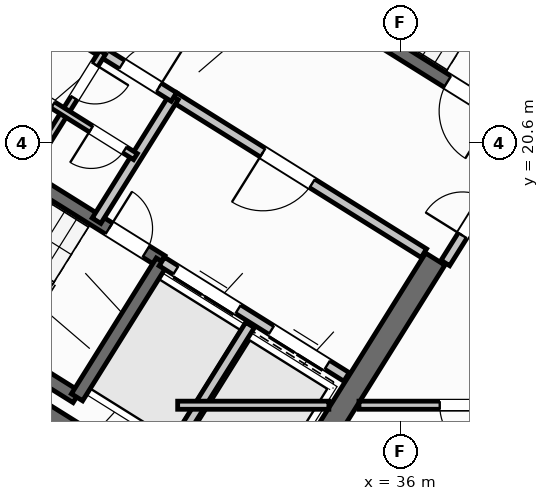
"""IFC4 building model, lengths in metres.
Left out: names, types, materials, properties, quantities, classifications, styles, units other than length and angle.
Written with IfcOpenShell. Run it as: python <this file> out.ifc"""

import sys

from ifc_helpers import new_model, si_unit, direction, frame, frame_2d, origin, place, context, subcontext, project, spatial, rectangle, extrude, source, transform, mapped, element, fill, save


model = new_model("IFC4")
c1 = context("Model", 3, precision=1e-05, world=origin(), true_north=direction((0.0, 1.0)))
c2 = subcontext(c1, "Body", "Model", "MODEL_VIEW")
j1 = project(units=[si_unit("LENGTHUNIT", "METRE"), si_unit("PLANEANGLEUNIT", "RADIAN")], contexts=[c1])
p1 = place(None, origin())
s1 = spatial("IfcSite", under=j1, at=p1, CompositionType="ELEMENT")
p2 = place(p1, origin())
s2 = spatial("IfcBuilding", under=s1, at=p2, CompositionType="ELEMENT")
p3 = place(p2, frame((0.0, 0.0, 277.2)))
s3 = spatial("IfcBuildingStorey", under=s2, at=p3, CompositionType="ELEMENT", Elevation=277.2)
p4 = place(p3, frame((33.324, 12.503, 0.0), z_axis=(0.0, 0.0, 1.0), x_axis=(-0.848043529849, 0.529926571782, 0.0)))
e1 = element("IfcWall", 1, at=p4, inside=s3, PredefinedType="SHEAR", context=c2, shape_type="SweptSolid", body=[
    extrude(rectangle(XDim=13.04, YDim=0.45, at=frame_2d((6.52, 0.0))), origin(), (0.0, 0.0, 1.0), 3.35),
])
p5 = place(p3, frame((36.683, 18.304, 0.0), z_axis=(0.0, 0.0, 1.0), x_axis=(-0.529904039071, -0.848057609704, 0.0)))
e2 = element("IfcWall", 2, at=p5, inside=s3, PredefinedType="SHEAR", context=c2, shape_type="SweptSolid", body=[
    extrude(rectangle(XDim=6.475, YDim=0.45, at=frame_2d((3.238, 0.0))), origin(), (0.0, 0.0, 1.0), 3.35),
])
p6 = place(p3, frame((29.268, 6.429, 0.0), z_axis=(0.0, 0.0, 1.0), x_axis=(-0.848049971435, 0.529916263149, 0.0)))
e3 = element("IfcWall", 3, at=p6, inside=s3, PredefinedType="STANDARD", context=c2, shape_type="SweptSolid", body=[
    extrude(rectangle(XDim=31.588, YDim=0.32, at=frame_2d((15.794, 0.0))), origin(), (0.0, 0.0, 1.0), 3.35),
])
p7 = place(p6, frame((16.362, 0.0, 0.0)))
e4 = element("IfcOpeningElement", 4, at=p7, cuts=e3, PredefinedType="OPENING", context=c2, shape_type="SweptSolid", body=[
    extrude(rectangle(XDim=1.2, YDim=2.15, at=frame_2d((0.6, 1.075))), frame((0.0, 0.17, 0.0), z_axis=(0.0, -1.0, 0.0), x_axis=(1.0, 0.0, 0.0)), (0.0, 0.0, 1.0), 0.34),
])
p8 = place(p6, frame((3.859, 0.0, 0.9)))
e5 = element("IfcOpeningElement", 5, at=p8, cuts=e3, PredefinedType="OPENING", context=c2, shape_type="SweptSolid", body=[
    extrude(rectangle(XDim=1.65, YDim=1.45, at=frame_2d((0.825, 0.725))), frame((0.0, 0.17, 0.0), z_axis=(0.0, -1.0, 0.0), x_axis=(1.0, 0.0, 0.0)), (0.0, 0.0, 1.0), 0.34),
])
p9 = place(p6, frame((10.519, 0.0, 0.9)))
e6 = element("IfcOpeningElement", 6, at=p9, cuts=e3, PredefinedType="OPENING", context=c2, shape_type="SweptSolid", body=[
    extrude(rectangle(XDim=1.65, YDim=1.45, at=frame_2d((0.825, 0.725))), frame((0.0, 0.17, 0.0), z_axis=(0.0, -1.0, 0.0), x_axis=(1.0, 0.0, 0.0)), (0.0, 0.0, 1.0), 0.34),
])
p10 = place(p6, frame((20.015, 0.0, 0.95)))
e7 = element("IfcOpeningElement", 7, at=p10, cuts=e3, PredefinedType="OPENING", context=c2, shape_type="SweptSolid", body=[
    extrude(rectangle(XDim=1.95, YDim=1.35, at=frame_2d((0.975, 0.675))), frame((0.0, 0.17, 0.0), z_axis=(0.0, -1.0, 0.0), x_axis=(1.0, 0.0, 0.0)), (0.0, 0.0, 1.0), 0.34),
])
p11 = place(p6, frame((23.715, 0.0, 1.0)))
e8 = element("IfcOpeningElement", 8, at=p11, cuts=e3, PredefinedType="OPENING", context=c2, shape_type="SweptSolid", body=[
    extrude(rectangle(XDim=0.9, YDim=1.25, at=frame_2d((0.45, 0.625))), frame((0.0, 0.17, 0.0), z_axis=(0.0, -1.0, 0.0), x_axis=(1.0, 0.0, 0.0)), (0.0, 0.0, 1.0), 0.34),
])
p12 = place(p6, frame((27.706, 0.0, 0.9)))
e9 = element("IfcOpeningElement", 9, at=p12, cuts=e3, PredefinedType="OPENING", context=c2, shape_type="SweptSolid", body=[
    extrude(rectangle(XDim=1.65, YDim=1.45, at=frame_2d((0.825, 0.725))), frame((0.0, 0.17, 0.0), z_axis=(0.0, -1.0, 0.0), x_axis=(1.0, 0.0, 0.0)), (0.0, 0.0, 1.0), 0.34),
])
p13 = place(p3, frame((29.605, 15.581, 0.0), z_axis=(0.0, 0.0, 1.0), x_axis=(-0.848036911448, 0.529937163087, 0.0)))
e10 = element("IfcWall", 10, at=p13, inside=s3, PredefinedType="SHEAR", context=c2, shape_type="SweptSolid", body=[
    extrude(rectangle(XDim=7.46, YDim=0.26, at=frame_2d((3.73, 0.0))), origin(), (0.0, 0.0, 1.0), 3.35),
])
p14 = place(p3, frame((31.28, 18.261, 0.0), z_axis=(0.0, 0.0, 1.0), x_axis=(-0.848051618787, 0.529913626805, 0.0)))
e11 = element("IfcWall", 11, at=p14, inside=s3, PredefinedType="SHEAR", context=c2, shape_type="SweptSolid", body=[
    extrude(rectangle(XDim=7.46, YDim=0.26, at=frame_2d((3.73, 0.0))), origin(), (0.0, 0.0, 1.0), 3.35),
])
p15 = place(p14, frame((0.36, 0.0, 0.0)))
e12 = element("IfcOpeningElement", 12, at=p15, cuts=e11, PredefinedType="OPENING", context=c2, shape_type="SweptSolid", body=[
    extrude(rectangle(XDim=0.86, YDim=2.05, at=frame_2d((0.43, 1.025))), frame((0.0, 0.14, 0.0), z_axis=(0.0, -1.0, 0.0), x_axis=(1.0, 0.0, 0.0)), (0.0, 0.0, 1.0), 0.28),
])
p16 = place(p3, frame((31.288, 18.256, 0.0), z_axis=(0.0, 0.0, 1.0), x_axis=(-0.529943379326, -0.848033026897, 0.0)))
e13 = element("IfcWall", 13, at=p16, inside=s3, PredefinedType="SHEAR", context=c2, shape_type="SweptSolid", body=[
    extrude(rectangle(XDim=3.16, YDim=0.26, at=frame_2d((1.58, 0.0))), origin(), (0.0, 0.0, 1.0), 3.35),
])
p17 = place(p3, frame((38.046, 21.108, 0.0), z_axis=(0.0, 0.0, 1.0), x_axis=(-0.848054434086, 0.529909121291, 0.0)))
e14 = element("IfcWall", 14, at=p17, inside=s3, PredefinedType="SHEAR", context=c2, shape_type="SweptSolid", body=[
    extrude(rectangle(XDim=7.33, YDim=0.26, at=frame_2d((3.665, 0.0))), origin(), (0.0, 0.0, 1.0), 3.35),
])
p18 = place(p17, frame((0.22, 0.0, 0.0)))
e15 = element("IfcOpeningElement", 15, at=p18, cuts=e14, PredefinedType="OPENING", context=c2, shape_type="SweptSolid", body=[
    extrude(rectangle(XDim=1.1, YDim=2.1, at=frame_2d((0.55, 1.05))), frame((0.0, 0.14, 0.0), z_axis=(0.0, -1.0, 0.0), x_axis=(1.0, 0.0, 0.0)), (0.0, 0.0, 1.0), 0.28),
])
p19 = place(p3, frame((34.933, 15.978, 0.0), z_axis=(0.0, 0.0, 1.0), x_axis=(-0.848055739377, 0.529907032327, 0.0)))
e16 = element("IfcWall", 16, at=p19, inside=s3, PredefinedType="STANDARD", context=c2, shape_type="SweptSolid", body=[
    extrude(rectangle(XDim=4.298, YDim=0.2, at=frame_2d((2.149, 0.0))), origin(), (0.0, 0.0, 1.0), 3.34),
])
p20 = place(p19, frame((0.448, 0.0, 0.0)))
e17 = element("IfcOpeningElement", 17, at=p20, cuts=e16, PredefinedType="OPENING", context=c2, shape_type="SweptSolid", body=[
    extrude(rectangle(XDim=1.3, YDim=2.2, at=frame_2d((0.65, 1.1))), frame((0.0, 0.11, 0.0), z_axis=(0.0, -1.0, 0.0), x_axis=(1.0, 0.0, 0.0)), (0.0, 0.0, 1.0), 0.22),
])
p21 = place(p19, frame((2.523, 0.0, 0.0)))
e18 = element("IfcOpeningElement", 18, at=p21, cuts=e16, PredefinedType="OPENING", context=c2, shape_type="SweptSolid", body=[
    extrude(rectangle(XDim=1.45, YDim=2.25, at=frame_2d((0.725, 1.125))), frame((0.0, 0.11, 0.0), z_axis=(0.0, -1.0, 0.0), x_axis=(1.0, 0.0, 0.0)), (0.0, 0.0, 1.0), 0.22),
])
p22 = place(p3, frame((36.459, 18.421, 0.0), z_axis=(0.0, 0.0, 1.0), x_axis=(-0.848059591691, 0.529900867089, 0.0)))
e19 = element("IfcWall", 19, at=p22, inside=s3, PredefinedType="STANDARD", context=c2, shape_type="SweptSolid", body=[
    extrude(rectangle(XDim=5.818, YDim=0.2, at=frame_2d((2.909, 0.0))), origin(), (0.0, 0.0, 1.0), 3.34),
])
p23 = place(p22, frame((2.598, 0.0, 0.0)))
e20 = element("IfcOpeningElement", 20, at=p23, cuts=e19, PredefinedType="OPENING", context=c2, shape_type="SweptSolid", body=[
    extrude(rectangle(XDim=1.15, YDim=2.1, at=frame_2d((0.575, 1.05))), frame((0.0, 0.11, 0.0), z_axis=(0.0, -1.0, 0.0), x_axis=(1.0, 0.0, 0.0)), (0.0, 0.0, 1.0), 0.22),
])
p24 = place(p3, frame((33.029, 17.003, 0.0), z_axis=(0.0, 0.0, 1.0), x_axis=(-0.529916267533, -0.848049968695, 0.0)))
e21 = element("IfcWall", 21, at=p24, inside=s3, PredefinedType="STANDARD", context=c2, shape_type="SweptSolid", body=[
    extrude(rectangle(XDim=2.92, YDim=0.2, at=frame_2d((1.46, 0.0))), origin(), (0.0, 0.0, 1.0), 3.34),
])
p25 = place(p3, frame((31.525, 21.504, 0.0), z_axis=(0.0, 0.0, 1.0), x_axis=(-0.529907497854, -0.848055448493, 0.0)))
e22 = element("IfcWall", 22, at=p25, inside=s3, PredefinedType="STANDARD", context=c2, shape_type="SweptSolid", body=[
    extrude(rectangle(XDim=2.88, YDim=0.2, at=frame_2d((1.44, 0.0))), origin(), (0.0, 0.0, 1.0), 3.34),
])
p26 = place(p3, frame((31.525, 21.504, 0.0), z_axis=(0.0, 0.0, 1.0), x_axis=(-0.848042066329, 0.529928913853, 0.0)))
e23 = element("IfcWall", 23, at=p26, inside=s3, PredefinedType="STANDARD", context=c2, shape_type="SweptSolid", body=[
    extrude(rectangle(XDim=6.268, YDim=0.2, at=frame_2d((3.134, 0.0))), origin(), (0.0, 0.0, 1.0), 3.34),
])
p27 = place(p26, frame((4.4, 0.0, 0.0)))
e24 = element("IfcOpeningElement", 24, at=p27, cuts=e23, PredefinedType="OPENING", context=c2, shape_type="SweptSolid", body=[
    extrude(rectangle(XDim=0.86, YDim=2.05, at=frame_2d((0.43, 1.025))), frame((0.0, 0.11, 0.0), z_axis=(0.0, -1.0, 0.0), x_axis=(1.0, 0.0, 0.0)), (0.0, 0.0, 1.0), 0.22),
])
p28 = place(p26, frame((0.35, 0.0, 0.0)))
e25 = element("IfcOpeningElement", 25, at=p28, cuts=e23, PredefinedType="OPENING", context=c2, shape_type="SweptSolid", body=[
    extrude(rectangle(XDim=0.86, YDim=2.05, at=frame_2d((0.43, 1.025))), frame((0.0, 0.11, 0.0), z_axis=(0.0, -1.0, 0.0), x_axis=(1.0, 0.0, 0.0)), (0.0, 0.0, 1.0), 0.22),
])
p29 = place(p3, frame((30.117, 22.384, 0.0), z_axis=(0.0, 0.0, 1.0), x_axis=(-0.529951914384, -0.848027693204, 0.0)))
e26 = element("IfcWall", 26, at=p29, inside=s3, PredefinedType="PLUMBINGWALL", context=c2, shape_type="SweptSolid", body=[
    extrude(rectangle(XDim=1.4, YDim=0.14, at=frame_2d((0.7, 0.0))), origin(), (0.0, 0.0, 1.0), 3.34),
])
p30 = place(p29, frame((0.28, 0.0, 0.0)))
e27 = element("IfcOpeningElement", 27, at=p30, cuts=e26, PredefinedType="OPENING", context=c2, shape_type="SweptSolid", body=[
    extrude(rectangle(XDim=0.78, YDim=2.05, at=frame_2d((0.39, 1.025))), frame((0.0, 0.08, 0.0), z_axis=(0.0, -1.0, 0.0), x_axis=(1.0, 0.0, 0.0)), (0.0, 0.0, 1.0), 0.16),
])
p31 = place(p3, frame((29.375, 21.196, 0.0), z_axis=(0.0, 0.0, 1.0), x_axis=(-0.529865479138, -0.848081702443, 0.0)))
e28 = element("IfcWall", 28, at=p31, inside=s3, PredefinedType="PLUMBINGWALL", context=c2, shape_type="SweptSolid", body=[
    extrude(rectangle(XDim=1.48, YDim=0.14, at=frame_2d((0.74, 0.0))), origin(), (0.0, 0.0, 1.0), 3.34),
])
p32 = place(p3, frame((30.766, 20.327, 0.0), z_axis=(0.0, 0.0, 1.0), x_axis=(-0.848052663127, 0.529911955482, 0.0)))
e29 = element("IfcWall", 29, at=p32, inside=s3, PredefinedType="PLUMBINGWALL", context=c2, shape_type="SweptSolid", body=[
    extrude(rectangle(XDim=3.28, YDim=0.14, at=frame_2d((1.64, 0.0))), origin(), (0.0, 0.0, 1.0), 3.34),
])
p33 = place(p32, frame((0.25, 0.0, 0.0)))
e30 = element("IfcOpeningElement", 30, at=p33, cuts=e29, PredefinedType="OPENING", context=c2, shape_type="SweptSolid", body=[
    extrude(rectangle(XDim=0.78, YDim=2.05, at=frame_2d((0.39, 1.025))), frame((0.0, 0.08, 0.0), z_axis=(0.0, -1.0, 0.0), x_axis=(1.0, 0.0, 0.0)), (0.0, 0.0, 1.0), 0.16),
])
p34 = place(p32, frame((1.92, 0.0, 0.0)))
e31 = element("IfcOpeningElement", 31, at=p34, cuts=e29, PredefinedType="OPENING", context=c2, shape_type="SweptSolid", body=[
    extrude(rectangle(XDim=0.78, YDim=2.05, at=frame_2d((0.39, 1.025))), frame((0.0, 0.08, 0.0), z_axis=(0.0, -1.0, 0.0), x_axis=(1.0, 0.0, 0.0)), (0.0, 0.0, 1.0), 0.16),
])
p35 = place(p3, frame((32.164, 10.374, 0.0), z_axis=(0.0, 0.0, 1.0), x_axis=(-0.848044107957, 0.529925646633, 0.0)))
e32 = element("IfcWall", 32, at=p35, inside=s3, PredefinedType="PARTITIONING", context=c2, shape_type="SweptSolid", body=[
    extrude(rectangle(XDim=15.57, YDim=0.16, at=frame_2d((7.785, 0.0))), origin(), (0.0, 0.0, 1.0), 3.34),
])
p36 = place(p35, frame((10.83, 0.0, 0.0)))
e33 = element("IfcOpeningElement", 33, at=p36, cuts=e32, PredefinedType="OPENING", context=c2, shape_type="SweptSolid", body=[
    extrude(rectangle(XDim=1.0, YDim=2.1, at=frame_2d((0.5, 1.05))), frame((0.0, 0.09, 0.0), z_axis=(0.0, -1.0, 0.0), x_axis=(1.0, 0.0, 0.0)), (0.0, 0.0, 1.0), 0.18),
])
p37 = place(p3, frame((29.72, 8.859, 0.0), z_axis=(0.0, 0.0, 1.0), x_axis=(-0.848049134363, 0.529917602752, 0.0)))
e34 = element("IfcWall", 34, at=p37, inside=s3, PredefinedType="PLUMBINGWALL", context=c2, shape_type="SweptSolid", body=[
    extrude(rectangle(XDim=14.3, YDim=0.14, at=frame_2d((7.15, 0.0))), origin(), (0.0, 0.0, 1.0), 3.34),
])
p38 = place(p37, frame((9.57, 0.0, 0.0)))
e35 = element("IfcOpeningElement", 35, at=p38, cuts=e34, PredefinedType="OPENING", context=c2, shape_type="SweptSolid", body=[
    extrude(rectangle(XDim=0.92, YDim=2.08, at=frame_2d((0.46, 1.04))), frame((0.0, 0.08, 0.0), z_axis=(0.0, -1.0, 0.0), x_axis=(1.0, 0.0, 0.0)), (0.0, 0.0, 1.0), 0.16),
])
p39 = place(p3, frame((38.451, 20.737, 0.0), z_axis=(0.0, 0.0, 1.0), x_axis=(-0.529924799939, -0.848044637038, 0.0)))
e36 = element("IfcWall", 36, at=p39, inside=s3, PredefinedType="STANDARD", context=c2, shape_type="SweptSolid", body=[
    extrude(rectangle(XDim=2.96, YDim=0.2, at=frame_2d((1.48, 0.0))), origin(), (0.0, 0.0, 1.0), 3.34),
])
p40 = place(p39, frame((1.46, 0.0, 0.0)))
e37 = element("IfcOpeningElement", 37, at=p40, cuts=e36, PredefinedType="OPENING", context=c2, shape_type="SweptSolid", body=[
    extrude(rectangle(XDim=0.86, YDim=2.05, at=frame_2d((0.43, 1.025))), frame((0.0, 0.11, 0.0), z_axis=(0.0, -1.0, 0.0), x_axis=(1.0, 0.0, 0.0)), (0.0, 0.0, 1.0), 0.22),
])
p41 = place(p3, frame((31.6, 15.42, 0.0), z_axis=(0.0, 0.0, 1.0), x_axis=(1.0, 0.0, 0.0)))
e38 = element("IfcWall", 38, at=p41, inside=s3, PredefinedType="PARTITIONING", context=c2, shape_type="SweptSolid", body=[
    extrude(rectangle(XDim=2.984, YDim=0.16, at=frame_2d((1.492, 0.0))), origin(), (0.0, 0.0, 1.0), 3.34),
])
p42 = place(p3, frame((35.178, 15.42, 0.0), z_axis=(0.0, 0.0, 1.0), x_axis=(1.0, 0.0, 0.0)))
e39 = element("IfcWall", 39, at=p42, inside=s3, PredefinedType="PARTITIONING", context=c2, shape_type="SweptSolid", body=[
    extrude(rectangle(XDim=9.021, YDim=0.16, at=frame_2d((4.511, 0.0))), origin(), (0.0, 0.0, 1.0), 3.34),
])
p43 = place(p42, frame((1.594, 0.0, 0.0)))
e40 = element("IfcOpeningElement", 40, at=p43, cuts=e39, PredefinedType="OPENING", context=c2, shape_type="SweptSolid", body=[
    extrude(rectangle(XDim=1.0, YDim=2.1, at=frame_2d((0.5, 1.05))), frame((0.0, 0.09, 0.0), z_axis=(0.0, -1.0, 0.0), x_axis=(1.0, 0.0, 0.0)), (0.0, 0.0, 1.0), 0.18),
])
m1 = source(origin(), c2, "Body", "SweptSolid", [
    extrude(rectangle(XDim=0.86, YDim=2.05, at=frame_2d((0.43, 1.025))), frame((0.0, 0.025, 0.0), z_axis=(0.0, -1.0, 0.0), x_axis=(1.0, 0.0, 0.0)), (0.0, 0.0, 1.0), 0.05),
])
p44 = place(p15, frame((0.86, 0.0, 0.0), z_axis=(0.0, 0.0, 1.0), x_axis=(-1.0, 0.0, 0.0)))
e41 = element("IfcDoor", 41, at=p44, inside=s3, OperationType="SINGLE_SWING_LEFT", PredefinedType="DOOR", context=c2, shape_type="MappedRepresentation", body=[
    mapped(m1, transform((0.0, 0.0, 0.0), scale=1.0)),
])
fill(e12, e41)
m2 = source(origin(), c2, "Body", "SweptSolid", [
    extrude(rectangle(XDim=1.1, YDim=2.1, at=frame_2d((0.55, 1.05))), frame((0.0, 0.025, 0.0), z_axis=(0.0, -1.0, 0.0), x_axis=(1.0, 0.0, 0.0)), (0.0, 0.0, 1.0), 0.05),
])
p45 = place(p18, origin())
e42 = element("IfcDoor", 42, at=p45, inside=s3, OperationType="SINGLE_SWING_LEFT", PredefinedType="DOOR", context=c2, shape_type="MappedRepresentation", body=[
    mapped(m2, transform((0.0, 0.0, 0.0), scale=1.0)),
])
fill(e15, e42)
m3 = source(origin(), c2, "Body", "SweptSolid", [
    extrude(rectangle(XDim=1.15, YDim=2.1, at=frame_2d((0.575, 1.05))), frame((0.0, 0.025, 0.0), z_axis=(0.0, -1.0, 0.0), x_axis=(1.0, 0.0, 0.0)), (0.0, 0.0, 1.0), 0.05),
])
p46 = place(p23, origin())
e43 = element("IfcDoor", 43, at=p46, inside=s3, OperationType="SINGLE_SWING_RIGHT", PredefinedType="DOOR", context=c2, shape_type="MappedRepresentation", body=[
    mapped(m3, transform((0.0, 0.0, 0.0), scale=1.0)),
])
fill(e20, e43)
m4 = source(origin(), c2, "Body", "SweptSolid", [
    extrude(rectangle(XDim=1.3, YDim=2.2, at=frame_2d((0.65, 1.1))), frame((0.0, 0.025, 0.0), z_axis=(0.0, -1.0, 0.0), x_axis=(1.0, 0.0, 0.0)), (0.0, 0.0, 1.0), 0.05),
])
p47 = place(p20, origin())
e44 = element("IfcDoor", 44, at=p47, inside=s3, OperationType="DOUBLE_DOOR_SLIDING", PredefinedType="DOOR", context=c2, shape_type="MappedRepresentation", body=[
    mapped(m4, transform((0.0, 0.0, 0.0), scale=1.0)),
])
fill(e17, e44)
m5 = source(origin(), c2, "Body", "SweptSolid", [
    extrude(rectangle(XDim=1.45, YDim=2.25, at=frame_2d((0.725, 1.125))), frame((0.0, 0.025, 0.0), z_axis=(0.0, -1.0, 0.0), x_axis=(1.0, 0.0, 0.0)), (0.0, 0.0, 1.0), 0.05),
])
p48 = place(p21, origin())
e45 = element("IfcDoor", 45, at=p48, inside=s3, OperationType="DOUBLE_DOOR_SLIDING", PredefinedType="DOOR", context=c2, shape_type="MappedRepresentation", body=[
    mapped(m5, transform((0.0, 0.0, 0.0), scale=1.0)),
])
fill(e18, e45)
p49 = place(p28, frame((0.86, 0.0, 0.0), z_axis=(0.0, 0.0, 1.0), x_axis=(-1.0, 0.0, 0.0)))
e46 = element("IfcDoor", 46, at=p49, inside=s3, OperationType="SINGLE_SWING_RIGHT", PredefinedType="DOOR", context=c2, shape_type="MappedRepresentation", body=[
    mapped(m1, transform((0.0, 0.0, 0.0), scale=1.0)),
])
fill(e25, e46)
m6 = source(origin(), c2, "Body", "SweptSolid", [
    extrude(rectangle(XDim=0.78, YDim=2.05, at=frame_2d((0.39, 1.025))), frame((0.0, 0.025, 0.0), z_axis=(0.0, -1.0, 0.0), x_axis=(1.0, 0.0, 0.0)), (0.0, 0.0, 1.0), 0.05),
])
p50 = place(p30, origin())
e47 = element("IfcDoor", 47, at=p50, inside=s3, OperationType="SINGLE_SWING_LEFT", PredefinedType="DOOR", context=c2, shape_type="MappedRepresentation", body=[
    mapped(m6, transform((0.0, 0.0, 0.0), scale=1.0)),
])
fill(e27, e47)
p51 = place(p33, origin())
e48 = element("IfcDoor", 48, at=p51, inside=s3, OperationType="SINGLE_SWING_RIGHT", PredefinedType="DOOR", context=c2, shape_type="MappedRepresentation", body=[
    mapped(m6, transform((0.0, 0.0, 0.0), scale=1.0)),
])
fill(e30, e48)
p52 = place(p34, origin())
e49 = element("IfcDoor", 49, at=p52, inside=s3, OperationType="SINGLE_SWING_LEFT", PredefinedType="DOOR", context=c2, shape_type="MappedRepresentation", body=[
    mapped(m6, transform((0.0, 0.0, 0.0), scale=1.0)),
])
fill(e31, e49)
p53 = place(p40, frame((0.86, 0.0, 0.0), z_axis=(0.0, 0.0, 1.0), x_axis=(-1.0, 0.0, 0.0)))
e50 = element("IfcDoor", 50, at=p53, inside=s3, OperationType="SINGLE_SWING_LEFT", PredefinedType="DOOR", context=c2, shape_type="MappedRepresentation", body=[
    mapped(m1, transform((0.0, 0.0, 0.0), scale=1.0)),
])
fill(e37, e50)
m7 = source(origin(), c2, "Body", "SweptSolid", [
    extrude(rectangle(XDim=1.0, YDim=2.1, at=frame_2d((0.5, 1.05))), frame((0.0, 0.025, 0.0), z_axis=(0.0, -1.0, 0.0), x_axis=(1.0, 0.0, 0.0)), (0.0, 0.0, 1.0), 0.05),
])
p54 = place(p43, frame((1.0, 0.0, 0.0), z_axis=(0.0, 0.0, 1.0), x_axis=(-1.0, 0.0, 0.0)))
e51 = element("IfcDoor", 51, at=p54, inside=s3, OperationType="SINGLE_SWING_LEFT", PredefinedType="DOOR", context=c2, shape_type="MappedRepresentation", body=[
    mapped(m7, transform((0.0, 0.0, 0.0), scale=1.0)),
])
fill(e40, e51)
save(model, sys.argv[1])
